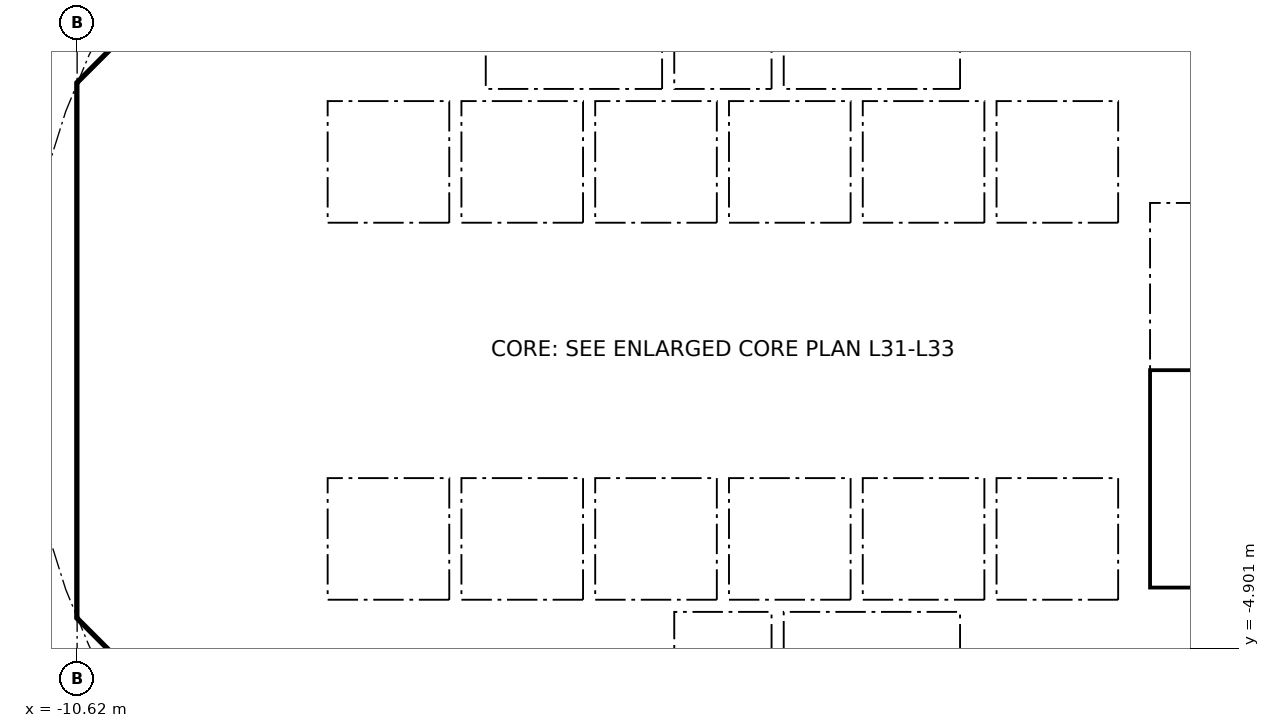
"""IFC4 building model, lengths in metres.
Left out: names, types, materials, properties, quantities, classifications, styles, units other than length and angle.
Written with IfcOpenShell. Run it as: python <this file> out.ifc"""

import sys

from ifc_helpers import new_model, si_unit, direction, frame, frame_2d, origin, place, context, subcontext, project, spatial, polyline, rectangle, outline, extrude, element, fill, save


model = new_model("IFC4")
c1 = context("Model", 3, precision=1e-05, world=origin(), true_north=direction((0.0, 1.0)))
c2 = subcontext(c1, "Body", "Model", "MODEL_VIEW")
j1 = project(units=[si_unit("LENGTHUNIT", "METRE"), si_unit("PLANEANGLEUNIT", "RADIAN")], contexts=[c1])
p1 = place(None, origin())
s1 = spatial("IfcSite", under=j1, at=p1, CompositionType="ELEMENT")
p2 = place(p1, origin())
s2 = spatial("IfcBuilding", under=s1, at=p2, CompositionType="ELEMENT")
p3 = place(p2, frame((0.0, 0.0, 127.0)))
s3 = spatial("IfcBuildingStorey", under=s2, at=p3, CompositionType="ELEMENT", Elevation=127.0)
p4 = place(p3, frame((9.988, 4.613, 0.0), z_axis=(0.0, 0.0, 1.0), x_axis=(-0.707106781187, 0.707106781187, 0.0)))
e1 = element("IfcWall", 1, at=p4, inside=s3, PredefinedType="SHEAR", context=c2, shape_type="SweptSolid", body=[
    extrude(rectangle(XDim=7.602, YDim=0.6, at=frame_2d((3.801, 0.0))), origin(), (0.0, 0.0, 1.0), 3.44),
])
p5 = place(p4, frame((3.201, 0.0, 0.0)))
e2 = element("IfcOpeningElement", 2, at=p5, cuts=e1, PredefinedType="OPENING", context=c2, shape_type="SweptSolid", body=[
    extrude(rectangle(XDim=1.2, YDim=2.1, at=frame_2d((0.6, 1.05))), frame((0.0, 0.31, 0.0), z_axis=(0.0, -1.0, 0.0), x_axis=(1.0, 0.0, 0.0)), (0.0, 0.0, 1.0), 0.62),
])
p6 = place(p3, frame((-4.613, 9.988, 0.0), z_axis=(0.0, 0.0, 1.0), x_axis=(-0.707106781187, -0.707106781187, 0.0)))
e3 = element("IfcWall", 3, at=p6, inside=s3, PredefinedType="SHEAR", context=c2, shape_type="SweptSolid", body=[
    extrude(rectangle(XDim=7.602, YDim=0.6, at=frame_2d((3.801, 0.0))), origin(), (0.0, 0.0, 1.0), 3.44),
])
p7 = place(p6, frame((0.351, 0.0, 0.0)))
e4 = element("IfcOpeningElement", 4, at=p7, cuts=e3, PredefinedType="OPENING", context=c2, shape_type="SweptSolid", body=[
    extrude(rectangle(XDim=1.1, YDim=2.1, at=frame_2d((0.55, 1.05))), frame((0.0, 0.31, 0.0), z_axis=(0.0, -1.0, 0.0), x_axis=(1.0, 0.0, 0.0)), (0.0, 0.0, 1.0), 0.62),
])
p8 = place(p3, frame((-10.325, 3.801, 0.0), z_axis=(0.0, 0.0, 1.0), x_axis=(0.0, -1.0, 0.0)))
e5 = element("IfcWall", 5, at=p8, inside=s3, PredefinedType="SHEAR", context=c2, shape_type="SweptSolid", body=[
    extrude(rectangle(XDim=7.602, YDim=0.6, at=frame_2d((3.801, 0.0))), origin(), (0.0, 0.0, 1.0), 3.44),
])
p9 = place(p8, frame((0.651, 0.0, 0.0)))
e6 = element("IfcOpeningElement", 6, at=p9, cuts=e5, PredefinedType="OPENING", context=c2, shape_type="SweptSolid", body=[
    extrude(rectangle(XDim=1.5, YDim=2.1, at=frame_2d((0.75, 1.05))), frame((0.0, 0.31, 0.0), z_axis=(0.0, -1.0, 0.0), x_axis=(1.0, 0.0, 0.0)), (0.0, 0.0, 1.0), 0.62),
])
p10 = place(p8, frame((5.451, 0.0, 0.0)))
e7 = element("IfcOpeningElement", 7, at=p10, cuts=e5, PredefinedType="OPENING", context=c2, shape_type="SweptSolid", body=[
    extrude(rectangle(XDim=1.5, YDim=2.1, at=frame_2d((0.75, 1.05))), frame((0.0, 0.31, 0.0), z_axis=(0.0, -1.0, 0.0), x_axis=(1.0, 0.0, 0.0)), (0.0, 0.0, 1.0), 0.62),
])
p11 = place(p3, frame((-9.988, -4.613, 0.0), z_axis=(0.0, 0.0, 1.0), x_axis=(0.707106781187, -0.707106781187, 0.0)))
e8 = element("IfcWall", 8, at=p11, inside=s3, PredefinedType="SHEAR", context=c2, shape_type="SweptSolid", body=[
    extrude(rectangle(XDim=7.602, YDim=0.6, at=frame_2d((3.801, 0.0))), origin(), (0.0, 0.0, 1.0), 3.44),
])
p12 = place(p11, frame((6.151, 0.0, 0.0)))
e9 = element("IfcOpeningElement", 9, at=p12, cuts=e8, PredefinedType="OPENING", context=c2, shape_type="SweptSolid", body=[
    extrude(rectangle(XDim=1.1, YDim=2.1, at=frame_2d((0.55, 1.05))), frame((0.0, 0.31, 0.0), z_axis=(0.0, -1.0, 0.0), x_axis=(1.0, 0.0, 0.0)), (0.0, 0.0, 1.0), 0.62),
])
p13 = place(p3, frame((4.613, -9.988, 0.0), z_axis=(0.0, 0.0, 1.0), x_axis=(0.707106781187, 0.707106781187, 0.0)))
e10 = element("IfcWall", 10, at=p13, inside=s3, PredefinedType="SHEAR", context=c2, shape_type="SweptSolid", body=[
    extrude(rectangle(XDim=7.602, YDim=0.6, at=frame_2d((3.801, 0.0))), origin(), (0.0, 0.0, 1.0), 3.44),
])
p14 = place(p13, frame((3.201, 0.0, 0.0)))
e11 = element("IfcOpeningElement", 11, at=p14, cuts=e10, PredefinedType="OPENING", context=c2, shape_type="SweptSolid", body=[
    extrude(rectangle(XDim=1.2, YDim=2.1, at=frame_2d((0.6, 1.05))), frame((0.0, 0.31, 0.0), z_axis=(0.0, -1.0, 0.0), x_axis=(1.0, 0.0, 0.0)), (0.0, 0.0, 1.0), 0.62),
])
p15 = place(p3, frame((-6.2, 4.3, 0.0), z_axis=(0.0, 0.0, 1.0), x_axis=(0.0, 1.0, 0.0)))
e12 = element("IfcWall", 12, at=p15, inside=s3, PredefinedType="PARTITIONING", context=c2, shape_type="SweptSolid", body=[
    extrude(rectangle(XDim=3.527, YDim=0.15, at=frame_2d((1.763, 0.0))), origin(), (0.0, 0.0, 1.0), 3.44),
])
p16 = place(p15, frame((0.262, 0.0, 0.0)))
e13 = element("IfcOpeningElement", 13, at=p16, cuts=e12, PredefinedType="OPENING", context=c2, shape_type="SweptSolid", body=[
    extrude(rectangle(XDim=0.9, YDim=2.1, at=frame_2d((0.45, 1.05))), frame((0.0, 0.085, 0.0), z_axis=(0.0, -1.0, 0.0), x_axis=(1.0, 0.0, 0.0)), (0.0, 0.0, 1.0), 0.17),
])
p17 = place(p15, frame((2.138, 0.0, 0.0)))
e14 = element("IfcOpeningElement", 14, at=p17, cuts=e12, PredefinedType="OPENING", context=c2, shape_type="SweptSolid", body=[
    extrude(rectangle(XDim=0.9, YDim=2.1, at=frame_2d((0.45, 1.05))), frame((0.0, 0.085, 0.0), z_axis=(0.0, -1.0, 0.0), x_axis=(1.0, 0.0, 0.0)), (0.0, 0.0, 1.0), 0.17),
])
p18 = place(p3, frame((4.0, 4.3, 0.0), z_axis=(0.0, 0.0, 1.0), x_axis=(0.0, 1.0, 0.0)))
e15 = element("IfcWall", 15, at=p18, inside=s3, PredefinedType="SOLIDWALL", context=c2, shape_type="SweptSolid", body=[
    extrude(rectangle(XDim=2.2, YDim=0.2, at=frame_2d((1.1, 0.0))), origin(), (0.0, 0.0, 1.0), 3.44),
])
p19 = place(p18, frame((0.55, 0.0, 0.0)))
e16 = element("IfcOpeningElement", 16, at=p19, cuts=e15, PredefinedType="OPENING", context=c2, shape_type="SweptSolid", body=[
    extrude(rectangle(XDim=1.1, YDim=2.1, at=frame_2d((0.55, 1.05))), frame((0.0, 0.11, 0.0), z_axis=(0.0, -1.0, 0.0), x_axis=(1.0, 0.0, 0.0)), (0.0, 0.0, 1.0), 0.22),
])
p20 = place(p3, frame((-4.0, 4.3, 0.0), z_axis=(0.0, 0.0, 1.0), x_axis=(0.0, 1.0, 0.0)))
e17 = element("IfcWall", 17, at=p20, inside=s3, PredefinedType="SOLIDWALL", context=c2, shape_type="SweptSolid", body=[
    extrude(rectangle(XDim=2.2, YDim=0.2, at=frame_2d((1.1, 0.0))), origin(), (0.0, 0.0, 1.0), 3.44),
])
p21 = place(p20, frame((0.55, 0.0, 0.0)))
e18 = element("IfcOpeningElement", 18, at=p21, cuts=e17, PredefinedType="OPENING", context=c2, shape_type="SweptSolid", body=[
    extrude(rectangle(XDim=1.1, YDim=2.1, at=frame_2d((0.55, 1.05))), frame((0.0, 0.11, 0.0), z_axis=(0.0, -1.0, 0.0), x_axis=(1.0, 0.0, 0.0)), (0.0, 0.0, 1.0), 0.22),
])
p22 = place(p3, frame((-6.7, 2.0, 0.0), z_axis=(0.0, 0.0, 1.0), x_axis=(1.0, 0.0, 0.0)))
e19 = element("IfcWall", 19, at=p22, inside=s3, PredefinedType="SOLIDWALL", context=c2, shape_type="SweptSolid", body=[
    extrude(rectangle(XDim=13.4, YDim=0.2, at=frame_2d((6.7, 0.0))), origin(), (0.0, 0.0, 1.0), 3.44),
])
p23 = place(p22, frame((0.65, 0.0, 0.0)))
e20 = element("IfcOpeningElement", 20, at=p23, cuts=e19, PredefinedType="OPENING", context=c2, shape_type="SweptSolid", body=[
    extrude(rectangle(XDim=1.1, YDim=2.1, at=frame_2d((0.55, 1.05))), frame((0.0, 0.11, 0.0), z_axis=(0.0, -1.0, 0.0), x_axis=(1.0, 0.0, 0.0)), (0.0, 0.0, 1.0), 0.22),
])
p24 = place(p22, frame((2.85, 0.0, 0.0)))
e21 = element("IfcOpeningElement", 21, at=p24, cuts=e19, PredefinedType="OPENING", context=c2, shape_type="SweptSolid", body=[
    extrude(rectangle(XDim=1.1, YDim=2.1, at=frame_2d((0.55, 1.05))), frame((0.0, 0.11, 0.0), z_axis=(0.0, -1.0, 0.0), x_axis=(1.0, 0.0, 0.0)), (0.0, 0.0, 1.0), 0.22),
])
p25 = place(p22, frame((5.05, 0.0, 0.0)))
e22 = element("IfcOpeningElement", 22, at=p25, cuts=e19, PredefinedType="OPENING", context=c2, shape_type="SweptSolid", body=[
    extrude(rectangle(XDim=1.1, YDim=2.1, at=frame_2d((0.55, 1.05))), frame((0.0, 0.11, 0.0), z_axis=(0.0, -1.0, 0.0), x_axis=(1.0, 0.0, 0.0)), (0.0, 0.0, 1.0), 0.22),
])
p26 = place(p3, frame((6.7, 4.0, 0.0), z_axis=(0.0, 0.0, 1.0), x_axis=(1.0, 0.0, 0.0)))
e23 = element("IfcWall", 23, at=p26, inside=s3, PredefinedType="SOLIDWALL", context=c2, shape_type="SweptSolid", body=[
    extrude(rectangle(XDim=3.325, YDim=0.2, at=frame_2d((1.662, 0.0))), origin(), (0.0, 0.0, 1.0), 3.44),
])
p27 = place(p26, frame((1.25, 0.0, 0.0)))
e24 = element("IfcOpeningElement", 24, at=p27, cuts=e23, PredefinedType="OPENING", context=c2, shape_type="SweptSolid", body=[
    extrude(rectangle(XDim=1.1, YDim=2.1, at=frame_2d((0.55, 1.05))), frame((0.0, 0.11, 0.0), z_axis=(0.0, -1.0, 0.0), x_axis=(1.0, 0.0, 0.0)), (0.0, 0.0, 1.0), 0.22),
])
p28 = place(p3, frame((-6.2, -7.827, 0.0), z_axis=(0.0, 0.0, 1.0), x_axis=(0.0, 1.0, 0.0)))
e25 = element("IfcWall", 25, at=p28, inside=s3, PredefinedType="PARTITIONING", context=c2, shape_type="SweptSolid", body=[
    extrude(rectangle(XDim=3.527, YDim=0.15, at=frame_2d((1.763, 0.0))), origin(), (0.0, 0.0, 1.0), 3.44),
])
p29 = place(p28, frame((2.365, 0.0, 0.0)))
e26 = element("IfcOpeningElement", 26, at=p29, cuts=e25, PredefinedType="OPENING", context=c2, shape_type="SweptSolid", body=[
    extrude(rectangle(XDim=0.9, YDim=2.1, at=frame_2d((0.45, 1.05))), frame((0.0, 0.085, 0.0), z_axis=(0.0, -1.0, 0.0), x_axis=(1.0, 0.0, 0.0)), (0.0, 0.0, 1.0), 0.17),
])
p30 = place(p28, frame((0.489, 0.0, 0.0)))
e27 = element("IfcOpeningElement", 27, at=p30, cuts=e25, PredefinedType="OPENING", context=c2, shape_type="SweptSolid", body=[
    extrude(rectangle(XDim=0.9, YDim=2.1, at=frame_2d((0.45, 1.05))), frame((0.0, 0.085, 0.0), z_axis=(0.0, -1.0, 0.0), x_axis=(1.0, 0.0, 0.0)), (0.0, 0.0, 1.0), 0.17),
])
p31 = place(p3, frame((4.0, -6.5, 0.0), z_axis=(0.0, 0.0, 1.0), x_axis=(0.0, 1.0, 0.0)))
e28 = element("IfcWall", 28, at=p31, inside=s3, PredefinedType="SOLIDWALL", context=c2, shape_type="SweptSolid", body=[
    extrude(rectangle(XDim=2.2, YDim=0.2, at=frame_2d((1.1, 0.0))), origin(), (0.0, 0.0, 1.0), 3.44),
])
p32 = place(p31, frame((0.55, 0.0, 0.0)))
e29 = element("IfcOpeningElement", 29, at=p32, cuts=e28, PredefinedType="OPENING", context=c2, shape_type="SweptSolid", body=[
    extrude(rectangle(XDim=1.1, YDim=2.1, at=frame_2d((0.55, 1.05))), frame((0.0, 0.11, 0.0), z_axis=(0.0, -1.0, 0.0), x_axis=(1.0, 0.0, 0.0)), (0.0, 0.0, 1.0), 0.22),
])
p33 = place(p3, frame((-4.0, -6.5, 0.0), z_axis=(0.0, 0.0, 1.0), x_axis=(0.0, 1.0, 0.0)))
e30 = element("IfcWall", 30, at=p33, inside=s3, PredefinedType="SOLIDWALL", context=c2, shape_type="SweptSolid", body=[
    extrude(rectangle(XDim=2.2, YDim=0.2, at=frame_2d((1.1, 0.0))), origin(), (0.0, 0.0, 1.0), 3.44),
])
p34 = place(p33, frame((0.65, 0.0, 0.0)))
e31 = element("IfcOpeningElement", 31, at=p34, cuts=e30, PredefinedType="OPENING", context=c2, shape_type="SweptSolid", body=[
    extrude(rectangle(XDim=0.9, YDim=2.1, at=frame_2d((0.45, 1.05))), frame((0.0, 0.11, 0.0), z_axis=(0.0, -1.0, 0.0), x_axis=(1.0, 0.0, 0.0)), (0.0, 0.0, 1.0), 0.22),
])
p35 = place(p3, frame((-6.7, -2.0, 0.0), z_axis=(0.0, 0.0, 1.0), x_axis=(1.0, 0.0, 0.0)))
e32 = element("IfcWall", 32, at=p35, inside=s3, PredefinedType="SOLIDWALL", context=c2, shape_type="SweptSolid", body=[
    extrude(rectangle(XDim=13.4, YDim=0.2, at=frame_2d((6.7, 0.0))), origin(), (0.0, 0.0, 1.0), 3.44),
])
p36 = place(p35, frame((0.65, 0.0, 0.0)))
e33 = element("IfcOpeningElement", 33, at=p36, cuts=e32, PredefinedType="OPENING", context=c2, shape_type="SweptSolid", body=[
    extrude(rectangle(XDim=1.1, YDim=2.1, at=frame_2d((0.55, 1.05))), frame((0.0, 0.11, 0.0), z_axis=(0.0, -1.0, 0.0), x_axis=(1.0, 0.0, 0.0)), (0.0, 0.0, 1.0), 0.22),
])
p37 = place(p35, frame((2.85, 0.0, 0.0)))
e34 = element("IfcOpeningElement", 34, at=p37, cuts=e32, PredefinedType="OPENING", context=c2, shape_type="SweptSolid", body=[
    extrude(rectangle(XDim=1.1, YDim=2.1, at=frame_2d((0.55, 1.05))), frame((0.0, 0.11, 0.0), z_axis=(0.0, -1.0, 0.0), x_axis=(1.0, 0.0, 0.0)), (0.0, 0.0, 1.0), 0.22),
])
p38 = place(p3, origin())
e35 = element("IfcWall", 35, at=p38, inside=s3, PredefinedType="SHEAR", context=c2, shape_type="SweptSolid", body=[
    extrude(outline(polyline([(-10.625, -3.801), (-10.025, -3.801), (-10.025, -4.152), (-9.776, -4.401), (-10.2, -4.825), (-10.625, -4.401), (-10.625, -3.801)])), origin(), (0.0, 0.0, 1.0), 3.44),
])
p39 = place(p3, origin())
e36 = element("IfcWall", 36, at=p39, inside=s3, PredefinedType="SHEAR", context=c2, shape_type="SweptSolid", body=[
    extrude(outline(polyline([(-10.2, 4.825), (-9.776, 4.401), (-10.025, 4.152), (-10.025, 3.801), (-10.625, 3.801), (-10.625, 4.401), (-10.2, 4.825)])), origin(), (0.0, 0.0, 1.0), 3.44),
])
for number, where, z_axis, x_axis in (
    (37, (-10.025, -4.0, 0.0), (0.0, 0.0, 1.0), (1.0, 0.0, 0.0)),
    (38, (-10.025, 4.0, 0.0), (0.0, 0.0, 1.0), (1.0, 0.0, 0.0)),
):
    element("IfcWall", number, at=place(p3, frame(where, z_axis=z_axis, x_axis=x_axis)), inside=s3, PredefinedType="PARTITIONING", context=c2, shape_type="SweptSolid", body=[
        extrude(rectangle(XDim=3.325, YDim=0.2, at=frame_2d((1.662, 0.0))), origin(), (0.0, 0.0, 1.0), 3.44),
    ])
for number, where, z_axis, x_axis in (
    (39, (-0.9, -6.5, 0.0), (0.0, 0.0, 1.0), (0.0, 1.0, 0.0)),
    (40, (0.9, -6.5, 0.0), (0.0, 0.0, 1.0), (0.0, 1.0, 0.0)),
):
    element("IfcWall", number, at=place(p3, frame(where, z_axis=z_axis, x_axis=x_axis)), inside=s3, PredefinedType="SOLIDWALL", context=c2, shape_type="SweptSolid", body=[
        extrude(rectangle(XDim=2.2, YDim=0.2, at=frame_2d((1.1, 0.0))), origin(), (0.0, 0.0, 1.0), 3.44),
    ])
p40 = place(p3, origin())
e41 = element("IfcWall", 41, at=p40, inside=s3, PredefinedType="SOLIDWALL", context=c2, shape_type="SweptSolid", body=[
    extrude(outline(polyline([(-6.7, -2.1), (-6.5, -2.1), (-6.5, -4.1), (-4.5, -4.1), (-4.5, -2.1), (-4.3, -2.1), (-4.3, -4.1), (-2.3, -4.1), (-2.3, -2.1), (-2.1, -2.1), (-2.1, -4.1), (-0.1, -4.1), (-0.1, -2.1), (0.1, -2.1), (0.1, -4.1), (2.1, -4.1), (2.1, -2.1), (2.3, -2.1), (2.3, -4.1), (4.3, -4.1), (4.3, -2.1), (4.5, -2.1), (4.5, -4.1), (6.5, -4.1), (6.5, -2.1), (6.7, -2.1), (6.7, -4.3), (-6.7, -4.3), (-6.7, -2.1)])), origin(), (0.0, 0.0, 1.0), 3.44),
])
for number, where, z_axis, x_axis in (
    (42, (-0.9, 4.3, 0.0), (0.0, 0.0, 1.0), (0.0, 1.0, 0.0)),
    (43, (0.9, 4.3, 0.0), (0.0, 0.0, 1.0), (0.0, 1.0, 0.0)),
):
    element("IfcWall", number, at=place(p3, frame(where, z_axis=z_axis, x_axis=x_axis)), inside=s3, PredefinedType="SOLIDWALL", context=c2, shape_type="SweptSolid", body=[
        extrude(rectangle(XDim=2.2, YDim=0.2, at=frame_2d((1.1, 0.0))), origin(), (0.0, 0.0, 1.0), 3.44),
    ])
p41 = place(p3, origin())
e44 = element("IfcWall", 44, at=p41, inside=s3, PredefinedType="SOLIDWALL", context=c2, shape_type="SweptSolid", body=[
    extrude(outline(polyline([(-6.5, 2.1), (-6.7, 2.1), (-6.7, 4.3), (6.7, 4.3), (6.7, 2.1), (6.5, 2.1), (6.5, 4.1), (4.5, 4.1), (4.5, 2.1), (4.3, 2.1), (4.3, 4.1), (2.3, 4.1), (2.3, 2.1), (2.1, 2.1), (2.1, 4.1), (0.1, 4.1), (0.1, 2.1), (-0.1, 2.1), (-0.1, 4.1), (-2.1, 4.1), (-2.1, 2.1), (-2.3, 2.1), (-2.3, 4.1), (-4.3, 4.1), (-4.3, 2.1), (-4.5, 2.1), (-4.5, 4.1), (-6.5, 4.1), (-6.5, 2.1)])), origin(), (0.0, 0.0, 1.0), 3.44),
])
p42 = place(p3, origin())
e45 = element("IfcWall", 45, at=p42, inside=s3, PredefinedType="SOLIDWALL", context=c2, shape_type="SweptSolid", body=[
    extrude(outline(polyline([(7.025, -3.9), (6.7, -3.9), (6.7, 3.9), (7.025, 3.9), (7.025, -3.9)])), origin(), (0.0, 0.0, 1.0), 3.44),
])
p43 = place(p3, origin())
e46 = element("IfcWall", 46, at=p43, inside=s3, PredefinedType="SOLIDWALL", context=c2, shape_type="SweptSolid", body=[
    extrude(outline(polyline([(10.025, -4.1), (6.7, -4.1), (6.7, -3.9), (10.025, -3.9), (10.025, -4.1)])), origin(), (0.0, 0.0, 1.0), 3.44),
])
p44 = place(p23, origin())
e47 = element("IfcDoor", 47, at=p44, inside=s3, OperationType="DOUBLE_DOOR_SLIDING", PredefinedType="DOOR", context=c2, shape_type="SweptSolid", body=[
    extrude(rectangle(XDim=1.1, YDim=2.1, at=frame_2d((0.55, 1.05))), frame((0.0, 0.025, 0.0), z_axis=(0.0, -1.0, 0.0), x_axis=(1.0, 0.0, 0.0)), (0.0, 0.0, 1.0), 0.05),
])
fill(e20, e47)
p45 = place(p24, origin())
e48 = element("IfcDoor", 48, at=p45, inside=s3, OperationType="DOUBLE_DOOR_SLIDING", PredefinedType="DOOR", context=c2, shape_type="SweptSolid", body=[
    extrude(rectangle(XDim=1.1, YDim=2.1, at=frame_2d((0.55, 1.05))), frame((0.0, 0.025, 0.0), z_axis=(0.0, -1.0, 0.0), x_axis=(1.0, 0.0, 0.0)), (0.0, 0.0, 1.0), 0.05),
])
fill(e21, e48)
p46 = place(p25, origin())
e49 = element("IfcDoor", 49, at=p46, inside=s3, OperationType="DOUBLE_DOOR_SLIDING", PredefinedType="DOOR", context=c2, shape_type="SweptSolid", body=[
    extrude(rectangle(XDim=1.1, YDim=2.1, at=frame_2d((0.55, 1.05))), frame((0.0, 0.025, 0.0), z_axis=(0.0, -1.0, 0.0), x_axis=(1.0, 0.0, 0.0)), (0.0, 0.0, 1.0), 0.05),
])
fill(e22, e49)
p47 = place(p36, origin())
e50 = element("IfcDoor", 50, at=p47, inside=s3, OperationType="DOUBLE_DOOR_SLIDING", PredefinedType="DOOR", context=c2, shape_type="SweptSolid", body=[
    extrude(rectangle(XDim=1.1, YDim=2.1, at=frame_2d((0.55, 1.05))), frame((0.0, 0.025, 0.0), z_axis=(0.0, -1.0, 0.0), x_axis=(1.0, 0.0, 0.0)), (0.0, 0.0, 1.0), 0.05),
])
fill(e33, e50)
p48 = place(p37, origin())
e51 = element("IfcDoor", 51, at=p48, inside=s3, OperationType="DOUBLE_DOOR_SLIDING", PredefinedType="DOOR", context=c2, shape_type="SweptSolid", body=[
    extrude(rectangle(XDim=1.1, YDim=2.1, at=frame_2d((0.55, 1.05))), frame((0.0, 0.025, 0.0), z_axis=(0.0, -1.0, 0.0), x_axis=(1.0, 0.0, 0.0)), (0.0, 0.0, 1.0), 0.05),
])
fill(e34, e51)
p49 = place(p19, origin())
e52 = element("IfcDoor", 52, at=p49, inside=s3, OperationType="DOUBLE_DOOR_SLIDING", PredefinedType="DOOR", context=c2, shape_type="SweptSolid", body=[
    extrude(rectangle(XDim=1.1, YDim=2.1, at=frame_2d((0.55, 1.05))), frame((0.0, 0.025, 0.0), z_axis=(0.0, -1.0, 0.0), x_axis=(1.0, 0.0, 0.0)), (0.0, 0.0, 1.0), 0.05),
])
fill(e16, e52)
p50 = place(p32, origin())
e53 = element("IfcDoor", 53, at=p50, inside=s3, OperationType="DOUBLE_DOOR_SLIDING", PredefinedType="DOOR", context=c2, shape_type="SweptSolid", body=[
    extrude(rectangle(XDim=1.1, YDim=2.1, at=frame_2d((0.55, 1.05))), frame((0.0, 0.025, 0.0), z_axis=(0.0, -1.0, 0.0), x_axis=(1.0, 0.0, 0.0)), (0.0, 0.0, 1.0), 0.05),
])
fill(e29, e53)
p51 = place(p21, origin())
e54 = element("IfcDoor", 54, at=p51, inside=s3, OperationType="DOUBLE_DOOR_SLIDING", PredefinedType="DOOR", context=c2, shape_type="SweptSolid", body=[
    extrude(rectangle(XDim=1.1, YDim=2.1, at=frame_2d((0.55, 1.05))), frame((0.0, 0.025, 0.0), z_axis=(0.0, -1.0, 0.0), x_axis=(1.0, 0.0, 0.0)), (0.0, 0.0, 1.0), 0.05),
])
fill(e18, e54)
p52 = place(p16, origin())
e55 = element("IfcDoor", 55, at=p52, inside=s3, OperationType="SINGLE_SWING_RIGHT", PredefinedType="DOOR", context=c2, shape_type="SweptSolid", body=[
    extrude(rectangle(XDim=0.9, YDim=2.1, at=frame_2d((0.45, 1.05))), frame((0.0, 0.025, 0.0), z_axis=(0.0, -1.0, 0.0), x_axis=(1.0, 0.0, 0.0)), (0.0, 0.0, 1.0), 0.05),
])
fill(e13, e55)
p53 = place(p29, origin())
e56 = element("IfcDoor", 56, at=p53, inside=s3, OperationType="SINGLE_SWING_RIGHT", PredefinedType="DOOR", context=c2, shape_type="SweptSolid", body=[
    extrude(rectangle(XDim=0.9, YDim=2.1, at=frame_2d((0.45, 1.05))), frame((0.0, 0.025, 0.0), z_axis=(0.0, -1.0, 0.0), x_axis=(1.0, 0.0, 0.0)), (0.0, 0.0, 1.0), 0.05),
])
fill(e26, e56)
p54 = place(p9, origin())
e57 = element("IfcDoor", 57, at=p54, inside=s3, OperationType="DOUBLE_DOOR_SINGLE_SWING", PredefinedType="DOOR", context=c2, shape_type="SweptSolid", body=[
    extrude(rectangle(XDim=1.5, YDim=2.1, at=frame_2d((0.75, 1.05))), frame((0.0, 0.025, 0.0), z_axis=(0.0, -1.0, 0.0), x_axis=(1.0, 0.0, 0.0)), (0.0, 0.0, 1.0), 0.05),
])
fill(e6, e57)
p55 = place(p10, origin())
e58 = element("IfcDoor", 58, at=p55, inside=s3, OperationType="DOUBLE_DOOR_SINGLE_SWING", PredefinedType="DOOR", context=c2, shape_type="SweptSolid", body=[
    extrude(rectangle(XDim=1.5, YDim=2.1, at=frame_2d((0.75, 1.05))), frame((0.0, 0.025, 0.0), z_axis=(0.0, -1.0, 0.0), x_axis=(1.0, 0.0, 0.0)), (0.0, 0.0, 1.0), 0.05),
])
fill(e7, e58)
save(model, sys.argv[1])
